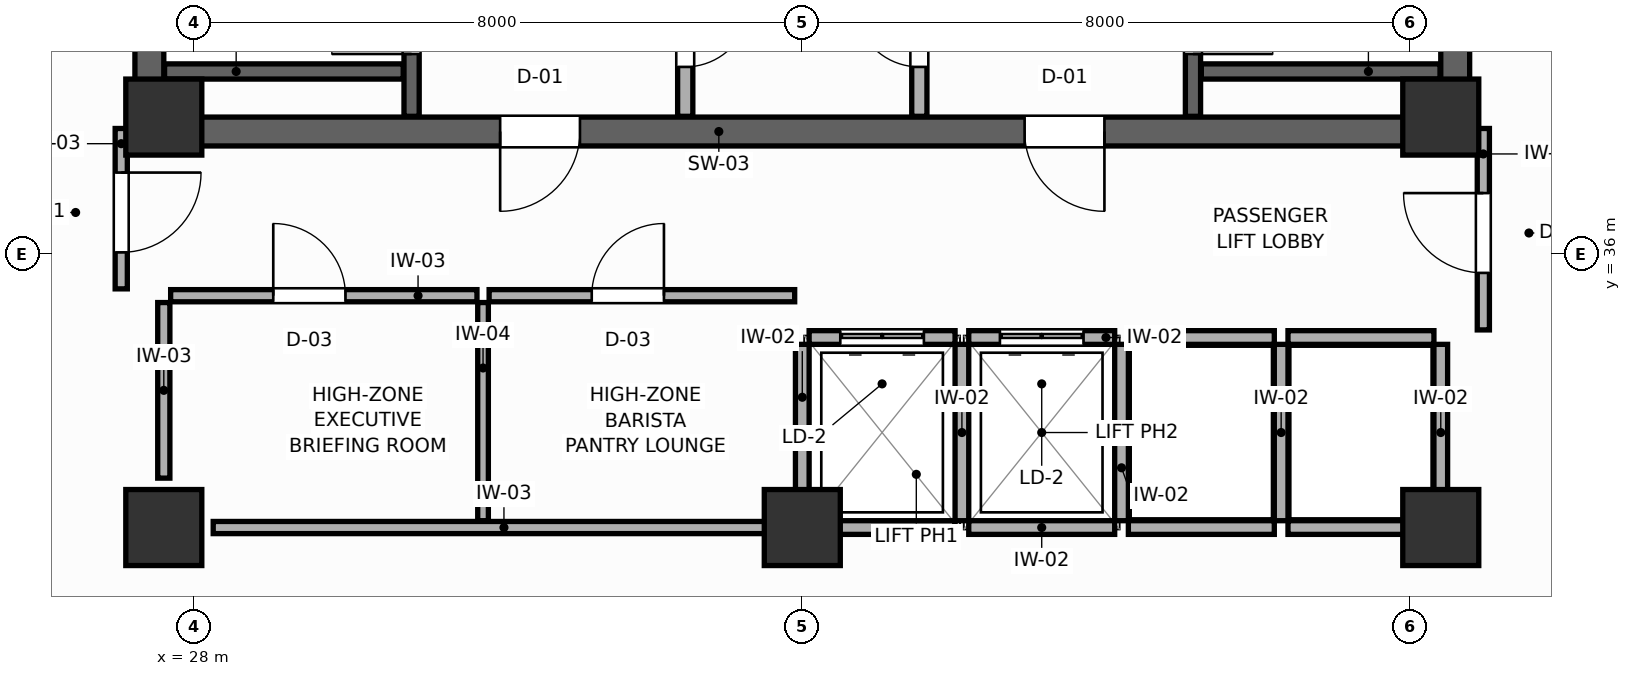
"""IFC4 building model, lengths in metres.
Left out: names, types, materials, properties, quantities, classifications, styles, units other than length and angle.
Written with IfcOpenShell. Run it as: python <this file> out.ifc"""

import sys

from ifc_helpers import new_model, si_unit, direction, frame, frame_2d, origin, origin_2d, place, context, subcontext, project, spatial, rectangle, extrude, source, transform, mapped, element, fill, save


model = new_model("IFC4")
c1 = context("Model", 3, precision=1e-05, world=origin(), true_north=direction((0.0, 1.0)))
c2 = subcontext(c1, "Body", "Model", "MODEL_VIEW")
j1 = project(units=[si_unit("LENGTHUNIT", "METRE"), si_unit("PLANEANGLEUNIT", "RADIAN")], contexts=[c1])
p1 = place(None, origin())
s1 = spatial("IfcSite", under=j1, at=p1, CompositionType="ELEMENT")
p2 = place(p1, origin())
s2 = spatial("IfcBuilding", under=s1, at=p2, CompositionType="ELEMENT")
p3 = place(p2, frame((0.0, 0.0, 223.8)))
s3 = spatial("IfcBuildingStorey", under=s2, at=p3, CompositionType="ELEMENT", Elevation=223.8)
p4 = place(p3, frame((27.22, 37.61, 0.0), z_axis=(0.0, 0.0, 1.0), x_axis=(1.0, 0.0, 0.0)))
e1 = element("IfcWall", 1, at=p4, inside=s3, PredefinedType="SHEAR", context=c2, shape_type="SweptSolid", body=[
    extrude(rectangle(XDim=17.56, YDim=0.38, at=frame_2d((8.78, 0.0))), origin(), (0.0, 0.0, 1.0), 3.6),
])
p5 = place(p4, frame((4.805, 0.0, 0.0)))
e2 = element("IfcOpeningElement", 2, at=p5, cuts=e1, PredefinedType="OPENING", context=c2, shape_type="SweptSolid", body=[
    extrude(rectangle(XDim=1.05, YDim=2.1, at=frame_2d((0.525, 1.05))), frame((0.0, 0.2, 0.0), z_axis=(0.0, -1.0, 0.0), x_axis=(1.0, 0.0, 0.0)), (0.0, 0.0, 1.0), 0.4),
])
p6 = place(p4, frame((11.705, 0.0, 0.0)))
e3 = element("IfcOpeningElement", 3, at=p6, cuts=e1, PredefinedType="OPENING", context=c2, shape_type="SweptSolid", body=[
    extrude(rectangle(XDim=1.05, YDim=2.1, at=frame_2d((0.525, 1.05))), frame((0.0, 0.2, 0.0), z_axis=(0.0, -1.0, 0.0), x_axis=(1.0, 0.0, 0.0)), (0.0, 0.0, 1.0), 0.4),
])
for number, where, z_axis, x_axis in (
    (4, (27.41, 37.8, 0.0), (0.0, 0.0, 1.0), (0.0, 1.0, 0.0)),
    (5, (44.59, 37.8, 0.0), (0.0, 0.0, 1.0), (0.0, 1.0, 0.0)),
):
    element("IfcWall", number, at=place(p3, frame(where, z_axis=z_axis, x_axis=x_axis)), inside=s3, PredefinedType="SHEAR", context=c2, shape_type="SweptSolid", body=[
        extrude(rectangle(XDim=9.0, YDim=0.38, at=frame_2d((4.5, 0.0))), origin(), (0.0, 0.0, 1.0), 3.6),
    ])
m1 = source(origin(), c2, "Body", "SweptSolid", [
    extrude(rectangle(XDim=1.0, YDim=1.0, at=origin_2d()), origin(), (0.0, 0.0, 1.0), 3.6),
])
for number, where, z_axis, x_axis in (
    (6, (27.6, 37.8, 0.0), (0.0, 0.0, 1.0), (1.0, 0.0, 0.0)),
    (7, (44.4, 37.8, 0.0), (0.0, 0.0, 1.0), (1.0, 0.0, 0.0)),
    (8, (27.6, 32.4, 0.0), (0.0, 0.0, 1.0), (1.0, 0.0, 0.0)),
    (9, (44.4, 32.4, 0.0), (0.0, 0.0, 1.0), (1.0, 0.0, 0.0)),
    (10, (36.0, 32.4, 0.0), (0.0, 0.0, 1.0), (1.0, 0.0, 0.0)),
):
    element("IfcColumn", number, at=place(p3, frame(where, z_axis=z_axis, x_axis=x_axis)), inside=s3, PredefinedType="COLUMN", context=c2, shape_type="MappedRepresentation", body=[
        mapped(m1, transform((0.0, 0.0, 0.0), scale=1.0)),
    ])
p7 = place(p3, frame((30.86, 37.81, 0.0), z_axis=(0.0, 0.0, 1.0), x_axis=(0.0, 1.0, 0.0)))
e11 = element("IfcWall", 11, at=p7, inside=s3, PredefinedType="SHEAR", context=c2, shape_type="SweptSolid", body=[
    extrude(rectangle(XDim=8.98, YDim=0.2, at=frame_2d((4.49, 0.0))), origin(), (0.0, 0.0, 1.0), 3.6),
])
p8 = place(p7, frame((0.82, 0.0, 0.0)))
e12 = element("IfcOpeningElement", 12, at=p8, cuts=e11, PredefinedType="OPENING", context=c2, shape_type="SweptSolid", body=[
    extrude(rectangle(XDim=1.05, YDim=2.1, at=frame_2d((0.525, 1.05))), frame((0.0, 0.11, 0.0), z_axis=(0.0, -1.0, 0.0), x_axis=(1.0, 0.0, 0.0)), (0.0, 0.0, 1.0), 0.22),
])
p9 = place(p3, frame((27.61, 38.4, 0.0), z_axis=(0.0, 0.0, 1.0), x_axis=(1.0, 0.0, 0.0)))
e13 = element("IfcWall", 13, at=p9, inside=s3, PredefinedType="SHEAR", context=c2, shape_type="SweptSolid", body=[
    extrude(rectangle(XDim=3.14, YDim=0.2, at=frame_2d((1.57, 0.0))), origin(), (0.0, 0.0, 1.0), 3.6),
])
p10 = place(p3, frame((41.14, 37.81, 0.0), z_axis=(0.0, 0.0, 1.0), x_axis=(0.0, 1.0, 0.0)))
e14 = element("IfcWall", 14, at=p10, inside=s3, PredefinedType="SHEAR", context=c2, shape_type="SweptSolid", body=[
    extrude(rectangle(XDim=8.98, YDim=0.2, at=frame_2d((4.49, 0.0))), origin(), (0.0, 0.0, 1.0), 3.6),
])
p11 = place(p10, frame((0.82, 0.0, 0.0)))
e15 = element("IfcOpeningElement", 15, at=p11, cuts=e14, PredefinedType="OPENING", context=c2, shape_type="SweptSolid", body=[
    extrude(rectangle(XDim=1.05, YDim=2.1, at=frame_2d((0.525, 1.05))), frame((0.0, 0.11, 0.0), z_axis=(0.0, -1.0, 0.0), x_axis=(1.0, 0.0, 0.0)), (0.0, 0.0, 1.0), 0.22),
])
p12 = place(p3, frame((41.25, 38.4, 0.0), z_axis=(0.0, 0.0, 1.0), x_axis=(1.0, 0.0, 0.0)))
e16 = element("IfcWall", 16, at=p12, inside=s3, PredefinedType="SHEAR", context=c2, shape_type="SweptSolid", body=[
    extrude(rectangle(XDim=3.14, YDim=0.2, at=frame_2d((1.57, 0.0))), origin(), (0.0, 0.0, 1.0), 3.6),
])
p13 = place(p3, frame((34.46, 37.81, 0.0), z_axis=(0.0, 0.0, 1.0), x_axis=(0.0, 1.0, 0.0)))
e17 = element("IfcWall", 17, at=p13, inside=s3, PredefinedType="PARTITIONING", context=c2, shape_type="SweptSolid", body=[
    extrude(rectangle(XDim=8.98, YDim=0.2, at=frame_2d((4.49, 0.0))), origin(), (0.0, 0.0, 1.0), 3.41),
])
p14 = place(p13, frame((0.65, 0.0, 0.0)))
e18 = element("IfcOpeningElement", 18, at=p14, cuts=e17, PredefinedType="OPENING", context=c2, shape_type="SweptSolid", body=[
    extrude(rectangle(XDim=0.85, YDim=2.05, at=frame_2d((0.425, 1.025))), frame((0.0, 0.11, 0.0), z_axis=(0.0, -1.0, 0.0), x_axis=(1.0, 0.0, 0.0)), (0.0, 0.0, 1.0), 0.22),
])
p15 = place(p3, frame((37.54, 37.81, 0.0), z_axis=(0.0, 0.0, 1.0), x_axis=(0.0, 1.0, 0.0)))
e19 = element("IfcWall", 19, at=p15, inside=s3, PredefinedType="PARTITIONING", context=c2, shape_type="SweptSolid", body=[
    extrude(rectangle(XDim=8.98, YDim=0.2, at=frame_2d((4.49, 0.0))), origin(), (0.0, 0.0, 1.0), 3.41),
])
p16 = place(p15, frame((0.65, 0.0, 0.0)))
e20 = element("IfcOpeningElement", 20, at=p16, cuts=e19, PredefinedType="OPENING", context=c2, shape_type="SweptSolid", body=[
    extrude(rectangle(XDim=0.85, YDim=2.05, at=frame_2d((0.425, 1.025))), frame((0.0, 0.11, 0.0), z_axis=(0.0, -1.0, 0.0), x_axis=(1.0, 0.0, 0.0)), (0.0, 0.0, 1.0), 0.22),
])
p17 = place(p3, frame((36.09, 34.9, 0.0), z_axis=(0.0, 0.0, 1.0), x_axis=(1.0, 0.0, 0.0)))
e21 = element("IfcWall", 21, at=p17, inside=s3, PredefinedType="PARTITIONING", context=c2, shape_type="SweptSolid", body=[
    extrude(rectangle(XDim=1.92, YDim=0.18, at=frame_2d((0.96, 0.0))), origin(), (0.0, 0.0, 1.0), 3.41),
])
p18 = place(p17, frame((0.41, 0.0, 0.0)))
e22 = element("IfcOpeningElement", 22, at=p18, cuts=e21, PredefinedType="OPENING", context=c2, shape_type="SweptSolid", body=[
    extrude(rectangle(XDim=1.1, YDim=2.1, at=frame_2d((0.55, 1.05))), frame((0.0, 0.1, 0.0), z_axis=(0.0, -1.0, 0.0), x_axis=(1.0, 0.0, 0.0)), (0.0, 0.0, 1.0), 0.2),
])
p19 = place(p3, frame((36.09, 32.4, 0.0), z_axis=(0.0, 0.0, 1.0), x_axis=(1.0, 0.0, 0.0)))
e23 = element("IfcWall", 23, at=p19, inside=s3, PredefinedType="PARTITIONING", context=c2, shape_type="SweptSolid", body=[
    extrude(rectangle(XDim=1.92, YDim=0.18, at=frame_2d((0.96, 0.0))), origin(), (0.0, 0.0, 1.0), 2.17),
])
p20 = place(p3, frame((36.0, 32.49, 0.0), z_axis=(0.0, 0.0, 1.0), x_axis=(0.0, 1.0, 0.0)))
e24 = element("IfcWall", 24, at=p20, inside=s3, PredefinedType="PARTITIONING", context=c2, shape_type="SweptSolid", body=[
    extrude(rectangle(XDim=2.32, YDim=0.18, at=frame_2d((1.16, 0.0))), origin(), (0.0, 0.0, 1.0), 3.41),
])
p21 = place(p3, frame((38.19, 34.9, 0.0), z_axis=(0.0, 0.0, 1.0), x_axis=(1.0, 0.0, 0.0)))
e25 = element("IfcWall", 25, at=p21, inside=s3, PredefinedType="PARTITIONING", context=c2, shape_type="SweptSolid", body=[
    extrude(rectangle(XDim=1.92, YDim=0.18, at=frame_2d((0.96, 0.0))), origin(), (0.0, 0.0, 1.0), 3.41),
])
p22 = place(p21, frame((0.41, 0.0, 0.0)))
e26 = element("IfcOpeningElement", 26, at=p22, cuts=e25, PredefinedType="OPENING", context=c2, shape_type="SweptSolid", body=[
    extrude(rectangle(XDim=1.1, YDim=2.1, at=frame_2d((0.55, 1.05))), frame((0.0, 0.1, 0.0), z_axis=(0.0, -1.0, 0.0), x_axis=(1.0, 0.0, 0.0)), (0.0, 0.0, 1.0), 0.2),
])
p23 = place(p3, frame((38.19, 32.4, 0.0), z_axis=(0.0, 0.0, 1.0), x_axis=(1.0, 0.0, 0.0)))
e27 = element("IfcWall", 27, at=p23, inside=s3, PredefinedType="PARTITIONING", context=c2, shape_type="SweptSolid", body=[
    extrude(rectangle(XDim=1.92, YDim=0.18, at=frame_2d((0.96, 0.0))), origin(), (0.0, 0.0, 1.0), 2.17),
])
p24 = place(p3, frame((38.1, 32.49, 0.0), z_axis=(0.0, 0.0, 1.0), x_axis=(0.0, 1.0, 0.0)))
e28 = element("IfcWall", 28, at=p24, inside=s3, PredefinedType="PARTITIONING", context=c2, shape_type="SweptSolid", body=[
    extrude(rectangle(XDim=2.32, YDim=0.18, at=frame_2d((1.16, 0.0))), origin(), (0.0, 0.0, 1.0), 3.41),
])
p25 = place(p3, frame((40.29, 34.9, 0.0), z_axis=(0.0, 0.0, 1.0), x_axis=(1.0, 0.0, 0.0)))
e29 = element("IfcWall", 29, at=p25, inside=s3, PredefinedType="PARTITIONING", context=c2, shape_type="SweptSolid", body=[
    extrude(rectangle(XDim=1.92, YDim=0.18, at=frame_2d((0.96, 0.0))), origin(), (0.0, 0.0, 1.0), 3.41),
])
p26 = place(p3, frame((40.29, 32.4, 0.0), z_axis=(0.0, 0.0, 1.0), x_axis=(1.0, 0.0, 0.0)))
e30 = element("IfcWall", 30, at=p26, inside=s3, PredefinedType="PARTITIONING", context=c2, shape_type="SweptSolid", body=[
    extrude(rectangle(XDim=1.92, YDim=0.18, at=frame_2d((0.96, 0.0))), origin(), (0.0, 0.0, 1.0), 2.17),
])
p27 = place(p3, frame((40.2, 32.49, 0.0), z_axis=(0.0, 0.0, 1.0), x_axis=(0.0, 1.0, 0.0)))
e31 = element("IfcWall", 31, at=p27, inside=s3, PredefinedType="PARTITIONING", context=c2, shape_type="SweptSolid", body=[
    extrude(rectangle(XDim=2.32, YDim=0.18, at=frame_2d((1.16, 0.0))), origin(), (0.0, 0.0, 1.0), 3.41),
])
p28 = place(p3, frame((42.39, 34.9, 0.0), z_axis=(0.0, 0.0, 1.0), x_axis=(1.0, 0.0, 0.0)))
e32 = element("IfcWall", 32, at=p28, inside=s3, PredefinedType="PARTITIONING", context=c2, shape_type="SweptSolid", body=[
    extrude(rectangle(XDim=1.92, YDim=0.18, at=frame_2d((0.96, 0.0))), origin(), (0.0, 0.0, 1.0), 3.41),
])
p29 = place(p3, frame((42.39, 32.4, 0.0), z_axis=(0.0, 0.0, 1.0), x_axis=(1.0, 0.0, 0.0)))
e33 = element("IfcWall", 33, at=p29, inside=s3, PredefinedType="PARTITIONING", context=c2, shape_type="SweptSolid", body=[
    extrude(rectangle(XDim=1.92, YDim=0.18, at=frame_2d((0.96, 0.0))), origin(), (0.0, 0.0, 1.0), 2.17),
])
for number, where, z_axis, x_axis in (
    (34, (42.3, 32.49, 0.0), (0.0, 0.0, 1.0), (0.0, 1.0, 0.0)),
    (35, (44.4, 32.49, 0.0), (0.0, 0.0, 1.0), (0.0, 1.0, 0.0)),
):
    element("IfcWall", number, at=place(p3, frame(where, z_axis=z_axis, x_axis=x_axis)), inside=s3, PredefinedType="PARTITIONING", context=c2, shape_type="SweptSolid", body=[
        extrude(rectangle(XDim=2.32, YDim=0.18, at=frame_2d((1.16, 0.0))), origin(), (0.0, 0.0, 1.0), 3.41),
    ])
p30 = place(p3, frame((28.25, 32.4, 0.0), z_axis=(0.0, 0.0, 1.0), x_axis=(1.0, 0.0, 0.0)))
e36 = element("IfcWall", 36, at=p30, inside=s3, PredefinedType="PARTITIONING", context=c2, shape_type="SweptSolid", body=[
    extrude(rectangle(XDim=7.65, YDim=0.16, at=frame_2d((3.825, 0.0))), origin(), (0.0, 0.0, 1.0), 2.17),
])
p31 = place(p3, frame((27.6, 33.05, 0.0), z_axis=(0.0, 0.0, 1.0), x_axis=(0.0, 1.0, 0.0)))
e37 = element("IfcWall", 37, at=p31, inside=s3, PredefinedType="PARTITIONING", context=c2, shape_type="SweptSolid", body=[
    extrude(rectangle(XDim=2.31, YDim=0.16, at=frame_2d((1.155, 0.0))), origin(), (0.0, 0.0, 1.0), 3.41),
])
p32 = place(p3, frame((31.8, 32.49, 0.0), z_axis=(0.0, 0.0, 1.0), x_axis=(0.0, 1.0, 0.0)))
e38 = element("IfcWall", 38, at=p32, inside=s3, PredefinedType="PARTITIONING", context=c2, shape_type="SweptSolid", body=[
    extrude(rectangle(XDim=2.87, YDim=0.14, at=frame_2d((1.435, 0.0))), origin(), (0.0, 0.0, 1.0), 3.41),
])
p33 = place(p3, frame((27.69, 35.45, 0.0), z_axis=(0.0, 0.0, 1.0), x_axis=(1.0, 0.0, 0.0)))
e39 = element("IfcWall", 39, at=p33, inside=s3, PredefinedType="PARTITIONING", context=c2, shape_type="SweptSolid", body=[
    extrude(rectangle(XDim=4.03, YDim=0.16, at=frame_2d((2.015, 0.0))), origin(), (0.0, 0.0, 1.0), 3.41),
])
p34 = place(p33, frame((1.35, 0.0, 0.0)))
e40 = element("IfcOpeningElement", 40, at=p34, cuts=e39, PredefinedType="OPENING", context=c2, shape_type="SweptSolid", body=[
    extrude(rectangle(XDim=0.95, YDim=2.05, at=frame_2d((0.475, 1.025))), frame((0.0, 0.09, 0.0), z_axis=(0.0, -1.0, 0.0), x_axis=(1.0, 0.0, 0.0)), (0.0, 0.0, 1.0), 0.18),
])
p35 = place(p3, frame((31.88, 35.45, 0.0), z_axis=(0.0, 0.0, 1.0), x_axis=(1.0, 0.0, 0.0)))
e41 = element("IfcWall", 41, at=p35, inside=s3, PredefinedType="PARTITIONING", context=c2, shape_type="SweptSolid", body=[
    extrude(rectangle(XDim=4.02, YDim=0.16, at=frame_2d((2.01, 0.0))), origin(), (0.0, 0.0, 1.0), 3.41),
])
p36 = place(p35, frame((1.35, 0.0, 0.0)))
e42 = element("IfcOpeningElement", 42, at=p36, cuts=e41, PredefinedType="OPENING", context=c2, shape_type="SweptSolid", body=[
    extrude(rectangle(XDim=0.95, YDim=2.05, at=frame_2d((0.475, 1.025))), frame((0.0, 0.09, 0.0), z_axis=(0.0, -1.0, 0.0), x_axis=(1.0, 0.0, 0.0)), (0.0, 0.0, 1.0), 0.18),
])
p37 = place(p3, frame((27.04, 35.54, 0.0), z_axis=(0.0, 0.0, 1.0), x_axis=(0.0, 1.0, 0.0)))
e43 = element("IfcWall", 43, at=p37, inside=s3, PredefinedType="PARTITIONING", context=c2, shape_type="SweptSolid", body=[
    extrude(rectangle(XDim=2.11, YDim=0.16, at=frame_2d((1.055, 0.0))), origin(), (0.0, 0.0, 1.0), 3.41),
])
p38 = place(p37, frame((0.48, 0.0, 0.0)))
e44 = element("IfcOpeningElement", 44, at=p38, cuts=e43, PredefinedType="OPENING", context=c2, shape_type="SweptSolid", body=[
    extrude(rectangle(XDim=1.05, YDim=2.1, at=frame_2d((0.525, 1.05))), frame((0.0, 0.09, 0.0), z_axis=(0.0, -1.0, 0.0), x_axis=(1.0, 0.0, 0.0)), (0.0, 0.0, 1.0), 0.18),
])
p39 = place(p3, frame((44.96, 35.0, 0.0), z_axis=(0.0, 0.0, 1.0), x_axis=(0.0, 1.0, 0.0)))
e45 = element("IfcWall", 45, at=p39, inside=s3, PredefinedType="PARTITIONING", context=c2, shape_type="SweptSolid", body=[
    extrude(rectangle(XDim=2.65, YDim=0.16, at=frame_2d((1.325, 0.0))), origin(), (0.0, 0.0, 1.0), 3.41),
])
p40 = place(p39, frame((0.75, 0.0, 0.0)))
e46 = element("IfcOpeningElement", 46, at=p40, cuts=e45, PredefinedType="OPENING", context=c2, shape_type="SweptSolid", body=[
    extrude(rectangle(XDim=1.05, YDim=2.1, at=frame_2d((0.525, 1.05))), frame((0.0, 0.09, 0.0), z_axis=(0.0, -1.0, 0.0), x_axis=(1.0, 0.0, 0.0)), (0.0, 0.0, 1.0), 0.18),
])
p41 = place(p8, origin())
e47 = element("IfcDoor", 47, at=p41, inside=s3, OperationType="SINGLE_SWING_LEFT", PredefinedType="DOOR", context=c2, shape_type="SweptSolid", body=[
    extrude(rectangle(XDim=1.05, YDim=2.1, at=frame_2d((0.525, 1.05))), frame((0.0, 0.025, 0.0), z_axis=(0.0, -1.0, 0.0), x_axis=(1.0, 0.0, 0.0)), (0.0, 0.0, 1.0), 0.05),
])
fill(e12, e47)
p42 = place(p11, frame((1.05, 0.0, 0.0), z_axis=(0.0, 0.0, 1.0), x_axis=(-1.0, 0.0, 0.0)))
e48 = element("IfcDoor", 48, at=p42, inside=s3, OperationType="SINGLE_SWING_RIGHT", PredefinedType="DOOR", context=c2, shape_type="SweptSolid", body=[
    extrude(rectangle(XDim=1.05, YDim=2.1, at=frame_2d((0.525, 1.05))), frame((0.0, 0.025, 0.0), z_axis=(0.0, -1.0, 0.0), x_axis=(1.0, 0.0, 0.0)), (0.0, 0.0, 1.0), 0.05),
])
fill(e15, e48)
p43 = place(p14, frame((0.85, 0.0, 0.0), z_axis=(0.0, 0.0, 1.0), x_axis=(-1.0, 0.0, 0.0)))
e49 = element("IfcDoor", 49, at=p43, inside=s3, OperationType="SINGLE_SWING_LEFT", PredefinedType="DOOR", context=c2, shape_type="SweptSolid", body=[
    extrude(rectangle(XDim=0.85, YDim=2.05, at=frame_2d((0.425, 1.025))), frame((0.0, 0.025, 0.0), z_axis=(0.0, -1.0, 0.0), x_axis=(1.0, 0.0, 0.0)), (0.0, 0.0, 1.0), 0.05),
])
fill(e18, e49)
p44 = place(p16, origin())
e50 = element("IfcDoor", 50, at=p44, inside=s3, OperationType="SINGLE_SWING_RIGHT", PredefinedType="DOOR", context=c2, shape_type="SweptSolid", body=[
    extrude(rectangle(XDim=0.85, YDim=2.05, at=frame_2d((0.425, 1.025))), frame((0.0, 0.025, 0.0), z_axis=(0.0, -1.0, 0.0), x_axis=(1.0, 0.0, 0.0)), (0.0, 0.0, 1.0), 0.05),
])
fill(e20, e50)
p45 = place(p18, origin())
e51 = element("IfcDoor", 51, at=p45, inside=s3, OperationType="DOUBLE_DOOR_SLIDING", PredefinedType="DOOR", context=c2, shape_type="SweptSolid", body=[
    extrude(rectangle(XDim=1.1, YDim=2.1, at=frame_2d((0.55, 1.05))), frame((0.0, 0.025, 0.0), z_axis=(0.0, -1.0, 0.0), x_axis=(1.0, 0.0, 0.0)), (0.0, 0.0, 1.0), 0.05),
])
fill(e22, e51)
p46 = place(p22, origin())
e52 = element("IfcDoor", 52, at=p46, inside=s3, OperationType="DOUBLE_DOOR_SLIDING", PredefinedType="DOOR", context=c2, shape_type="SweptSolid", body=[
    extrude(rectangle(XDim=1.1, YDim=2.1, at=frame_2d((0.55, 1.05))), frame((0.0, 0.025, 0.0), z_axis=(0.0, -1.0, 0.0), x_axis=(1.0, 0.0, 0.0)), (0.0, 0.0, 1.0), 0.05),
])
fill(e26, e52)
p47 = place(p34, origin())
e53 = element("IfcDoor", 53, at=p47, inside=s3, OperationType="SINGLE_SWING_LEFT", PredefinedType="DOOR", context=c2, shape_type="SweptSolid", body=[
    extrude(rectangle(XDim=0.95, YDim=2.05, at=frame_2d((0.475, 1.025))), frame((0.0, 0.025, 0.0), z_axis=(0.0, -1.0, 0.0), x_axis=(1.0, 0.0, 0.0)), (0.0, 0.0, 1.0), 0.05),
])
fill(e40, e53)
p48 = place(p36, origin())
e54 = element("IfcDoor", 54, at=p48, inside=s3, OperationType="SINGLE_SWING_RIGHT", PredefinedType="DOOR", context=c2, shape_type="SweptSolid", body=[
    extrude(rectangle(XDim=0.95, YDim=2.05, at=frame_2d((0.475, 1.025))), frame((0.0, 0.025, 0.0), z_axis=(0.0, -1.0, 0.0), x_axis=(1.0, 0.0, 0.0)), (0.0, 0.0, 1.0), 0.05),
])
fill(e42, e54)
p49 = place(p38, frame((1.05, 0.0, 0.0), z_axis=(0.0, 0.0, 1.0), x_axis=(-1.0, 0.0, 0.0)))
e55 = element("IfcDoor", 55, at=p49, inside=s3, OperationType="SINGLE_SWING_LEFT", PredefinedType="DOOR", context=c2, shape_type="SweptSolid", body=[
    extrude(rectangle(XDim=1.05, YDim=2.1, at=frame_2d((0.525, 1.05))), frame((0.0, 0.025, 0.0), z_axis=(0.0, -1.0, 0.0), x_axis=(1.0, 0.0, 0.0)), (0.0, 0.0, 1.0), 0.05),
])
fill(e44, e55)
p50 = place(p40, origin())
e56 = element("IfcDoor", 56, at=p50, inside=s3, OperationType="SINGLE_SWING_RIGHT", PredefinedType="DOOR", context=c2, shape_type="SweptSolid", body=[
    extrude(rectangle(XDim=1.05, YDim=2.1, at=frame_2d((0.525, 1.05))), frame((0.0, 0.025, 0.0), z_axis=(0.0, -1.0, 0.0), x_axis=(1.0, 0.0, 0.0)), (0.0, 0.0, 1.0), 0.05),
])
fill(e46, e56)
p51 = place(p5, frame((1.05, 0.0, 0.0), z_axis=(0.0, 0.0, 1.0), x_axis=(-1.0, 0.0, 0.0)))
e57 = element("IfcDoor", 57, at=p51, inside=s3, OperationType="SINGLE_SWING_RIGHT", PredefinedType="DOOR", context=c2, shape_type="SweptSolid", body=[
    extrude(rectangle(XDim=1.05, YDim=2.1, at=frame_2d((0.525, 1.05))), frame((0.0, 0.025, 0.0), z_axis=(0.0, -1.0, 0.0), x_axis=(1.0, 0.0, 0.0)), (0.0, 0.0, 1.0), 0.05),
])
fill(e2, e57)
p52 = place(p6, frame((1.05, 0.0, 0.0), z_axis=(0.0, 0.0, 1.0), x_axis=(-1.0, 0.0, 0.0)))
e58 = element("IfcDoor", 58, at=p52, inside=s3, OperationType="SINGLE_SWING_LEFT", PredefinedType="DOOR", context=c2, shape_type="SweptSolid", body=[
    extrude(rectangle(XDim=1.05, YDim=2.1, at=frame_2d((0.525, 1.05))), frame((0.0, 0.025, 0.0), z_axis=(0.0, -1.0, 0.0), x_axis=(1.0, 0.0, 0.0)), (0.0, 0.0, 1.0), 0.05),
])
fill(e3, e58)
save(model, sys.argv[1])
